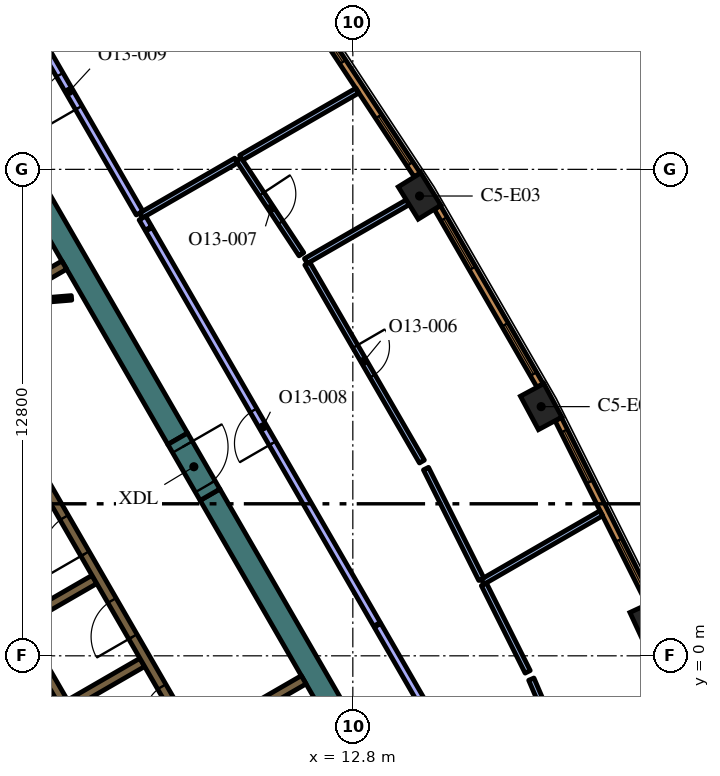
"""IFC4 building model, lengths in metres.
Left out: names, types, materials, properties, quantities, classifications, styles, units other than length and angle.
Written with IfcOpenShell. Run it as: python <this file> out.ifc"""

import sys

from ifc_helpers import new_model, si_unit, direction, frame, frame_2d, origin, origin_2d, place, context, subcontext, project, spatial, polyline, rectangle, outline, extrude, element, fill, save


model = new_model("IFC4")
c1 = context("Model", 3, precision=1e-05, world=origin(), true_north=direction((0.0, 1.0)))
c2 = subcontext(c1, "Body", "Model", "MODEL_VIEW")
j1 = project(units=[si_unit("LENGTHUNIT", "METRE"), si_unit("PLANEANGLEUNIT", "RADIAN")], contexts=[c1])
p1 = place(None, origin())
s1 = spatial("IfcSite", under=j1, at=p1, CompositionType="ELEMENT")
p2 = place(p1, origin())
s2 = spatial("IfcBuilding", under=s1, at=p2, CompositionType="ELEMENT")
p3 = place(p2, frame((0.0, 0.0, 292.2)))
s3 = spatial("IfcBuildingStorey", under=s2, at=p3, CompositionType="ELEMENT", Elevation=292.2)
for number, where, z_axis, x_axis in (
    (1, (20.619, 0.834, 0.0), (0.0, 0.0, 1.0), (-0.421, 0.907, 0.0)),
    (2, (17.756, 6.557, 0.0), (0.0, 0.0, 1.0), (-0.474, 0.881, 0.0)),
    (3, (14.556, 12.098, 0.0), (0.0, 0.0, 1.0), (-0.526, 0.851, 0.0)),
):
    element("IfcColumn", number, at=place(p3, frame(where, z_axis=z_axis, x_axis=x_axis)), inside=s3, PredefinedType="COLUMN", context=c2, shape_type="SweptSolid", body=[
        extrude(rectangle(XDim=1.0, YDim=0.7, at=origin_2d()), origin(), (0.0, 0.0, 1.0), 4.2),
    ])
for number, where, z_axis, x_axis in (
    (4, (9.042, 4.239, 0.0), (0.0, 0.0, 1.0), (0.5, -0.866, 0.0)),
    (5, (1.989, 16.456, 0.0), (0.0, 0.0, 1.0), (0.5, -0.866, 0.0)),
):
    element("IfcWall", number, at=place(p3, frame(where, z_axis=z_axis, x_axis=x_axis)), inside=s3, PredefinedType="SOLIDWALL", context=c2, shape_type="SweptSolid", body=[
        extrude(rectangle(XDim=12.406, YDim=0.6, at=frame_2d((6.203, 0.0))), origin(), (0.0, 0.0, 1.0), 4.2),
    ])
p4 = place(p3, origin())
e6 = element("IfcWall", 6, at=p4, inside=s3, PredefinedType="SOLIDWALL", context=c2, shape_type="SweptSolid", body=[
    extrude(outline(polyline([(0.332, 6.925), (0.335, 6.925), (0.335, 6.925), (0.335, 6.925), (0.335, 7.075), (0.335, 7.075), (0.335, 7.075), (0.245, 7.075), (0.035, 7.439), (0.252, 7.564), (0.377, 7.348), (1.512, 5.382), (1.637, 5.165), (2.221, 4.153), (2.771, 3.199), (2.896, 2.983), (3.138, 2.564), (4.031, 1.017), (4.156, 0.801), (5.292, -1.165), (5.417, -1.382), (6.073, -2.519), (6.552, -3.348), (6.677, -3.564), (6.46, -3.689), (0.332, 6.925)])), origin(), (0.0, 0.0, 1.0), 4.2),
])
for number, where, z_axis, x_axis in (
    (7, (4.094, 0.909, 0.0), (0.0, 0.0, 1.0), (0.866, 0.5, 0.0)),
    (8, (5.354, -1.274, 0.0), (0.0, 0.0, 1.0), (0.866, 0.5, 0.0)),
):
    element("IfcWall", number, at=place(p3, frame(where, z_axis=z_axis, x_axis=x_axis)), inside=s3, PredefinedType="SOLIDWALL", context=c2, shape_type="SweptSolid", body=[
        extrude(rectangle(XDim=2.2, YDim=0.25, at=frame_2d((1.1, 0.0))), origin(), (0.0, 0.0, 1.0), 4.2),
    ])
p5 = place(p3, frame((11.507, -0.631, 0.0), z_axis=(0.0, 0.0, 1.0), x_axis=(-0.866011447264, -0.500024172624, 0.0)))
e9 = element("IfcWall", 9, at=p5, inside=s3, PredefinedType="SOLIDWALL", context=c2, shape_type="SweptSolid", body=[
    extrude(rectangle(XDim=5.65, YDim=0.25, at=frame_2d((2.825, 0.0))), origin(), (0.0, 0.0, 1.0), 4.2),
])
p6 = place(p3, frame((3.83, 9.486, 0.0), z_axis=(0.0, 0.0, 1.0), x_axis=(0.865986202621, 0.500067892261, 0.0)))
e10 = element("IfcWall", 10, at=p6, inside=s3, PredefinedType="SOLIDWALL", context=c2, shape_type="SweptSolid", body=[
    extrude(rectangle(XDim=1.591, YDim=0.25, at=frame_2d((0.795, 0.0))), origin(), (0.0, 0.0, 1.0), 4.2),
])
p7 = place(p3, frame((8.565, -2.185, 0.0), z_axis=(0.0, 0.0, 1.0), x_axis=(-0.499997954832, 0.866026584559, 0.0)))
e11 = element("IfcWall", 11, at=p7, inside=s3, PredefinedType="SOLIDWALL", context=c2, shape_type="SweptSolid", body=[
    extrude(rectangle(XDim=12.35, YDim=0.25, at=frame_2d((6.175, 0.0))), origin(), (0.0, 0.0, 1.0), 4.2),
])
p8 = place(p7, frame((0.685, 0.0, 0.0)))
e12 = element("IfcOpeningElement", 12, at=p8, cuts=e11, PredefinedType="OPENING", context=c2, shape_type="SweptSolid", body=[
    extrude(rectangle(XDim=0.9, YDim=2.1, at=frame_2d((0.45, 1.05))), frame((0.0, 0.135, 0.0), z_axis=(0.0, -1.0, 0.0), x_axis=(1.0, 0.0, 0.0)), (0.0, 0.0, 1.0), 0.27),
])
p9 = place(p7, frame((3.105, 0.0, 0.0)))
e13 = element("IfcOpeningElement", 13, at=p9, cuts=e11, PredefinedType="OPENING", context=c2, shape_type="SweptSolid", body=[
    extrude(rectangle(XDim=1.1, YDim=2.1, at=frame_2d((0.55, 1.05))), frame((0.0, 0.135, 0.0), z_axis=(0.0, -1.0, 0.0), x_axis=(1.0, 0.0, 0.0)), (0.0, 0.0, 1.0), 0.27),
])
p10 = place(p7, frame((5.625, 0.0, 0.0)))
e14 = element("IfcOpeningElement", 14, at=p10, cuts=e11, PredefinedType="OPENING", context=c2, shape_type="SweptSolid", body=[
    extrude(rectangle(XDim=1.1, YDim=2.1, at=frame_2d((0.55, 1.05))), frame((0.0, 0.135, 0.0), z_axis=(0.0, -1.0, 0.0), x_axis=(1.0, 0.0, 0.0)), (0.0, 0.0, 1.0), 0.27),
])
p11 = place(p7, frame((8.145, 0.0, 0.0)))
e15 = element("IfcOpeningElement", 15, at=p11, cuts=e11, PredefinedType="OPENING", context=c2, shape_type="SweptSolid", body=[
    extrude(rectangle(XDim=1.1, YDim=2.1, at=frame_2d((0.55, 1.05))), frame((0.0, 0.135, 0.0), z_axis=(0.0, -1.0, 0.0), x_axis=(1.0, 0.0, 0.0)), (0.0, 0.0, 1.0), 0.27),
])
p12 = place(p7, frame((10.665, 0.0, 0.0)))
e16 = element("IfcOpeningElement", 16, at=p12, cuts=e11, PredefinedType="OPENING", context=c2, shape_type="SweptSolid", body=[
    extrude(rectangle(XDim=1.1, YDim=2.1, at=frame_2d((0.55, 1.05))), frame((0.0, 0.135, 0.0), z_axis=(0.0, -1.0, 0.0), x_axis=(1.0, 0.0, 0.0)), (0.0, 0.0, 1.0), 0.27),
])
p13 = place(p3, frame((5.398, 9.419, 0.0), z_axis=(0.0, 0.0, 1.0), x_axis=(-0.996653416376, -0.081743303248, 0.0)))
e17 = element("IfcWall", 17, at=p13, inside=s3, PredefinedType="PARTITIONING", context=c2, shape_type="SweptSolid", body=[
    extrude(rectangle(XDim=2.7, YDim=0.12, at=frame_2d((1.35, 0.0))), origin(), (0.0, 0.0, 1.0), 3.55),
])
p14 = place(p13, frame((1.45, 0.0, 0.0)))
e18 = element("IfcOpeningElement", 18, at=p14, cuts=e17, PredefinedType="OPENING", context=c2, shape_type="SweptSolid", body=[
    extrude(rectangle(XDim=0.9, YDim=2.1, at=frame_2d((0.45, 1.05))), frame((0.0, 0.07, 0.0), z_axis=(0.0, -1.0, 0.0), x_axis=(1.0, 0.0, 0.0)), (0.0, 0.0, 1.0), 0.14),
])
p15 = place(p3, frame((8.192, 5.711, 0.0), z_axis=(0.0, 0.0, 1.0), x_axis=(0.500062241894, -0.865989465428, 0.0)))
e19 = element("IfcWall", 19, at=p15, inside=s3, PredefinedType="SOLIDWALL", context=c2, shape_type="SweptSolid", body=[
    extrude(rectangle(XDim=1.7, YDim=0.6, at=frame_2d((0.85, 0.0))), origin(), (0.0, 0.0, 1.0), 4.2),
])
p16 = place(p15, frame((0.25, 0.0, 0.0)))
e20 = element("IfcOpeningElement", 20, at=p16, cuts=e19, PredefinedType="OPENING", context=c2, shape_type="SweptSolid", body=[
    extrude(rectangle(XDim=1.2, YDim=2.1, at=frame_2d((0.6, 1.05))), frame((0.0, 0.31, 0.0), z_axis=(0.0, -1.0, 0.0), x_axis=(1.0, 0.0, 0.0)), (0.0, 0.0, 1.0), 0.62),
])
p17 = place(p3, frame((16.215, 1.948, 0.0), z_axis=(0.0, 0.0, 1.0), x_axis=(0.866026634742, 0.499997867913, 0.0)))
e21 = element("IfcWall", 21, at=p17, inside=s3, PredefinedType="PARTITIONING", context=c2, shape_type="SweptSolid", body=[
    extrude(rectangle(XDim=3.606, YDim=0.15, at=frame_2d((1.803, 0.0))), origin(), (0.0, 0.0, 1.0), 3.55),
])
p18 = place(p3, frame((17.497, -0.613, 0.0), z_axis=(0.0, 0.0, 1.0), x_axis=(0.393381340755, -0.919375397075, 0.0)))
e22 = element("IfcWall", 22, at=p18, inside=s3, PredefinedType="PARTITIONING", context=c2, shape_type="SweptSolid", body=[
    extrude(rectangle(XDim=5.368, YDim=0.15, at=frame_2d((2.684, 0.0))), origin(), (0.0, 0.0, 1.0), 3.55),
])
p19 = place(p18, frame((2.268, 0.0, 0.0)))
e23 = element("IfcOpeningElement", 23, at=p19, cuts=e22, PredefinedType="OPENING", context=c2, shape_type="SweptSolid", body=[
    extrude(rectangle(XDim=0.9, YDim=2.1, at=frame_2d((0.45, 1.05))), frame((0.0, 0.085, 0.0), z_axis=(0.0, -1.0, 0.0), x_axis=(1.0, 0.0, 0.0)), (0.0, 0.0, 1.0), 0.17),
])
p20 = place(p3, frame((17.401, -0.422, 0.0), z_axis=(0.0, 0.0, 1.0), x_axis=(-0.447479029466, 0.894294424778, 0.0)))
e24 = element("IfcWall", 24, at=p20, inside=s3, PredefinedType="PARTITIONING", context=c2, shape_type="SweptSolid", body=[
    extrude(rectangle(XDim=2.575, YDim=0.15, at=frame_2d((1.288, 0.0))), origin(), (0.0, 0.0, 1.0), 3.55),
])
p21 = place(p3, frame((11.564, 10.387, 0.0), z_axis=(0.0, 0.0, 1.0), x_axis=(0.86604641216, 0.499963610661, 0.0)))
e25 = element("IfcWall", 25, at=p21, inside=s3, PredefinedType="PARTITIONING", context=c2, shape_type="SweptSolid", body=[
    extrude(rectangle(XDim=3.096, YDim=0.15, at=frame_2d((1.548, 0.0))), origin(), (0.0, 0.0, 1.0), 3.55),
])
p22 = place(p3, frame((16.181, 2.015, 0.0), z_axis=(0.0, 0.0, 1.0), x_axis=(-0.447513663313, 0.894277094165, 0.0)))
e26 = element("IfcWall", 26, at=p22, inside=s3, PredefinedType="PARTITIONING", context=c2, shape_type="SweptSolid", body=[
    extrude(rectangle(XDim=3.254, YDim=0.15, at=frame_2d((1.627, 0.0))), origin(), (0.0, 0.0, 1.0), 3.55),
])
p23 = place(p3, frame((11.602, 10.322, 0.0), z_axis=(0.0, 0.0, 1.0), x_axis=(0.500961140821, -0.865469777281, 0.0)))
e27 = element("IfcWall", 27, at=p23, inside=s3, PredefinedType="PARTITIONING", context=c2, shape_type="SweptSolid", body=[
    extrude(rectangle(XDim=6.021, YDim=0.15, at=frame_2d((3.01, 0.0))), origin(), (0.0, 0.0, 1.0), 3.55),
])
p24 = place(p23, frame((2.521, 0.0, 0.0)))
e28 = element("IfcOpeningElement", 28, at=p24, cuts=e27, PredefinedType="OPENING", context=c2, shape_type="SweptSolid", body=[
    extrude(rectangle(XDim=0.9, YDim=2.1, at=frame_2d((0.45, 1.05))), frame((0.0, 0.085, 0.0), z_axis=(0.0, -1.0, 0.0), x_axis=(1.0, 0.0, 0.0)), (0.0, 0.0, 1.0), 0.17),
])
p25 = place(p3, frame((9.795, 13.068, 0.0), z_axis=(0.0, 0.0, 1.0), x_axis=(0.550767347659, -0.834658809786, 0.0)))
e29 = element("IfcWall", 29, at=p25, inside=s3, PredefinedType="PARTITIONING", context=c2, shape_type="SweptSolid", body=[
    extrude(rectangle(XDim=2.999, YDim=0.15, at=frame_2d((1.5, 0.0))), origin(), (0.0, 0.0, 1.0), 3.55),
])
p26 = place(p25, frame((1.099, 0.0, 0.0)))
e30 = element("IfcOpeningElement", 30, at=p26, cuts=e29, PredefinedType="OPENING", context=c2, shape_type="SweptSolid", body=[
    extrude(rectangle(XDim=0.9, YDim=2.1, at=frame_2d((0.45, 1.05))), frame((0.0, 0.085, 0.0), z_axis=(0.0, -1.0, 0.0), x_axis=(1.0, 0.0, 0.0)), (0.0, 0.0, 1.0), 0.17),
])
p27 = place(p3, frame((9.86, 13.106, 0.0), z_axis=(0.0, 0.0, 1.0), x_axis=(0.866022094817, 0.500005731256, 0.0)))
e31 = element("IfcWall", 31, at=p27, inside=s3, PredefinedType="PARTITIONING", context=c2, shape_type="SweptSolid", body=[
    extrude(rectangle(XDim=3.531, YDim=0.15, at=frame_2d((1.766, 0.0))), origin(), (0.0, 0.0, 1.0), 3.55),
])
p28 = place(p3, frame((7.226, 11.585, 0.0), z_axis=(0.0, 0.0, 1.0), x_axis=(0.866021079084, 0.500007490527, 0.0)))
e32 = element("IfcWall", 32, at=p28, inside=s3, PredefinedType="PARTITIONING", context=c2, shape_type="SweptSolid", body=[
    extrude(rectangle(XDim=2.892, YDim=0.15, at=frame_2d((1.446, 0.0))), origin(), (0.0, 0.0, 1.0), 3.55),
])
p29 = place(p3, frame((13.436, 0.829, 0.0), z_axis=(0.0, 0.0, 1.0), x_axis=(-0.49999894854, 0.866026010844, 0.0)))
e33 = element("IfcWall", 33, at=p29, inside=s3, PredefinedType="PARTITIONING", context=c2, shape_type="SweptSolid", body=[
    extrude(rectangle(XDim=12.0, YDim=0.2, at=frame_2d((6.0, 0.0))), origin(), (0.0, 0.0, 1.0), 3.55),
])
p30 = place(p29, frame((5.5, 0.0, 0.0)))
e34 = element("IfcOpeningElement", 34, at=p30, cuts=e33, PredefinedType="OPENING", context=c2, shape_type="SweptSolid", body=[
    extrude(rectangle(XDim=1.0, YDim=2.1, at=frame_2d((0.5, 1.05))), frame((0.0, 0.11, 0.0), z_axis=(0.0, -1.0, 0.0), x_axis=(1.0, 0.0, 0.0)), (0.0, 0.0, 1.0), 0.22),
])
p31 = place(p3, frame((7.421, 11.247, 0.0), z_axis=(0.0, 0.0, 1.0), x_axis=(-0.500303403544, 0.865850162789, 0.0)))
e35 = element("IfcWall", 35, at=p31, inside=s3, PredefinedType="PARTITIONING", context=c2, shape_type="SweptSolid", body=[
    extrude(rectangle(XDim=0.315, YDim=0.2, at=frame_2d((0.158, 0.0))), origin(), (0.0, 0.0, 1.0), 3.55),
])
p32 = place(p3, frame((17.565, -6.324, 0.0), z_axis=(0.0, 0.0, 1.0), x_axis=(-0.499977548053, 0.866038366034, 0.0)))
e36 = element("IfcWall", 36, at=p32, inside=s3, PredefinedType="PARTITIONING", context=c2, shape_type="SweptSolid", body=[
    extrude(rectangle(XDim=8.229, YDim=0.2, at=frame_2d((4.115, 0.0))), origin(), (0.0, 0.0, 1.0), 3.55),
])
p33 = place(p3, frame((7.188, 11.65, 0.0), z_axis=(0.0, 0.0, 1.0), x_axis=(-0.499989634868, 0.866031388014, 0.0)))
e37 = element("IfcWall", 37, at=p33, inside=s3, PredefinedType="PARTITIONING", context=c2, shape_type="SweptSolid", body=[
    extrude(rectangle(XDim=7.303, YDim=0.2, at=frame_2d((3.652, 0.0))), origin(), (0.0, 0.0, 1.0), 3.55),
])
p34 = place(p33, frame((3.2, 0.0, 0.0)))
e38 = element("IfcOpeningElement", 38, at=p34, cuts=e37, PredefinedType="OPENING", context=c2, shape_type="SweptSolid", body=[
    extrude(rectangle(XDim=1.0, YDim=2.1, at=frame_2d((0.5, 1.05))), frame((0.0, 0.11, 0.0), z_axis=(0.0, -1.0, 0.0), x_axis=(1.0, 0.0, 0.0)), (0.0, 0.0, 1.0), 0.22),
])
p35 = place(p3, frame((20.625, 1.392, 0.0), z_axis=(0.0, 0.0, 1.0), x_axis=(-0.447484531401, 0.894291671747, 0.0)))
e39 = element("IfcWall", 39, at=p35, inside=s3, PredefinedType="SOLIDWALL", context=c2, shape_type="SweptSolid", body=[
    extrude(rectangle(XDim=5.406, YDim=0.19, at=frame_2d((2.703, 0.0))), origin(), (0.0, 0.0, 1.0), 3.95),
])
p36 = place(p35, frame((0.346, 0.0, 0.6)))
e40 = element("IfcOpeningElement", 40, at=p36, cuts=e39, PredefinedType="OPENING", context=c2, shape_type="SweptSolid", body=[
    extrude(rectangle(XDim=1.5, YDim=2.85, at=frame_2d((0.75, 1.425))), frame((0.0, 0.105, 0.0), z_axis=(0.0, -1.0, 0.0), x_axis=(1.0, 0.0, 0.0)), (0.0, 0.0, 1.0), 0.21),
])
p37 = place(p35, frame((3.559, 0.0, 0.6)))
e41 = element("IfcOpeningElement", 41, at=p37, cuts=e39, PredefinedType="OPENING", context=c2, shape_type="SweptSolid", body=[
    extrude(rectangle(XDim=1.5, YDim=2.85, at=frame_2d((0.75, 1.425))), frame((0.0, 0.105, 0.0), z_axis=(0.0, -1.0, 0.0), x_axis=(1.0, 0.0, 0.0)), (0.0, 0.0, 1.0), 0.21),
])
p38 = place(p3, frame((17.728, 7.114, 0.0), z_axis=(0.0, 0.0, 1.0), x_axis=(-0.500024767483, 0.866011103799, 0.0)))
e42 = element("IfcWall", 42, at=p38, inside=s3, PredefinedType="SOLIDWALL", context=c2, shape_type="SweptSolid", body=[
    extrude(rectangle(XDim=5.406, YDim=0.19, at=frame_2d((2.703, 0.0))), origin(), (0.0, 0.0, 1.0), 3.95),
])
p39 = place(p38, frame((0.346, 0.0, 0.6)))
e43 = element("IfcOpeningElement", 43, at=p39, cuts=e42, PredefinedType="OPENING", context=c2, shape_type="SweptSolid", body=[
    extrude(rectangle(XDim=1.5, YDim=2.85, at=frame_2d((0.75, 1.425))), frame((0.0, 0.105, 0.0), z_axis=(0.0, -1.0, 0.0), x_axis=(1.0, 0.0, 0.0)), (0.0, 0.0, 1.0), 0.21),
])
p40 = place(p38, frame((3.56, 0.0, 0.6)))
e44 = element("IfcOpeningElement", 44, at=p40, cuts=e42, PredefinedType="OPENING", context=c2, shape_type="SweptSolid", body=[
    extrude(rectangle(XDim=1.5, YDim=2.85, at=frame_2d((0.75, 1.425))), frame((0.0, 0.105, 0.0), z_axis=(0.0, -1.0, 0.0), x_axis=(1.0, 0.0, 0.0)), (0.0, 0.0, 1.0), 0.21),
])
p41 = place(p3, frame((14.496, 12.653, 0.0), z_axis=(0.0, 0.0, 1.0), x_axis=(-0.550744054781, 0.83467417962, 0.0)))
e45 = element("IfcWall", 45, at=p41, inside=s3, PredefinedType="SOLIDWALL", context=c2, shape_type="SweptSolid", body=[
    extrude(rectangle(XDim=5.406, YDim=0.19, at=frame_2d((2.703, 0.0))), origin(), (0.0, 0.0, 1.0), 3.95),
])
p42 = place(p41, frame((0.346, 0.0, 0.6)))
e46 = element("IfcOpeningElement", 46, at=p42, cuts=e45, PredefinedType="OPENING", context=c2, shape_type="SweptSolid", body=[
    extrude(rectangle(XDim=1.5, YDim=2.85, at=frame_2d((0.75, 1.425))), frame((0.0, 0.105, 0.0), z_axis=(0.0, -1.0, 0.0), x_axis=(1.0, 0.0, 0.0)), (0.0, 0.0, 1.0), 0.21),
])
p43 = place(p41, frame((3.559, 0.0, 0.6)))
e47 = element("IfcOpeningElement", 47, at=p43, cuts=e45, PredefinedType="OPENING", context=c2, shape_type="SweptSolid", body=[
    extrude(rectangle(XDim=1.5, YDim=2.85, at=frame_2d((0.75, 1.425))), frame((0.0, 0.105, 0.0), z_axis=(0.0, -1.0, 0.0), x_axis=(1.0, 0.0, 0.0)), (0.0, 0.0, 1.0), 0.21),
])
p44 = place(p8, origin())
e48 = element("IfcDoor", 48, at=p44, inside=s3, OperationType="SINGLE_SWING_LEFT", PredefinedType="DOOR", context=c2, shape_type="SweptSolid", body=[
    extrude(rectangle(XDim=0.9, YDim=2.1, at=frame_2d((0.45, 1.05))), frame((0.0, 0.025, 0.0), z_axis=(0.0, -1.0, 0.0), x_axis=(1.0, 0.0, 0.0)), (0.0, 0.0, 1.0), 0.05),
])
fill(e12, e48)
p45 = place(p9, origin())
e49 = element("IfcDoor", 49, at=p45, inside=s3, OperationType="DOUBLE_DOOR_SLIDING", PredefinedType="DOOR", context=c2, shape_type="SweptSolid", body=[
    extrude(rectangle(XDim=1.1, YDim=2.1, at=frame_2d((0.55, 1.05))), frame((0.0, 0.025, 0.0), z_axis=(0.0, -1.0, 0.0), x_axis=(1.0, 0.0, 0.0)), (0.0, 0.0, 1.0), 0.05),
])
fill(e13, e49)
p46 = place(p10, origin())
e50 = element("IfcDoor", 50, at=p46, inside=s3, OperationType="DOUBLE_DOOR_SLIDING", PredefinedType="DOOR", context=c2, shape_type="SweptSolid", body=[
    extrude(rectangle(XDim=1.1, YDim=2.1, at=frame_2d((0.55, 1.05))), frame((0.0, 0.025, 0.0), z_axis=(0.0, -1.0, 0.0), x_axis=(1.0, 0.0, 0.0)), (0.0, 0.0, 1.0), 0.05),
])
fill(e14, e50)
p47 = place(p16, origin())
e51 = element("IfcDoor", 51, at=p47, inside=s3, OperationType="SINGLE_SWING_LEFT", PredefinedType="DOOR", context=c2, shape_type="SweptSolid", body=[
    extrude(rectangle(XDim=1.2, YDim=2.1, at=frame_2d((0.6, 1.05))), frame((0.0, 0.025, 0.0), z_axis=(0.0, -1.0, 0.0), x_axis=(1.0, 0.0, 0.0)), (0.0, 0.0, 1.0), 0.05),
])
fill(e20, e51)
p48 = place(p24, origin())
e52 = element("IfcDoor", 52, at=p48, inside=s3, OperationType="SINGLE_SWING_LEFT", PredefinedType="DOOR", context=c2, shape_type="SweptSolid", body=[
    extrude(rectangle(XDim=0.9, YDim=2.1, at=frame_2d((0.45, 1.05))), frame((0.0, 0.025, 0.0), z_axis=(0.0, -1.0, 0.0), x_axis=(1.0, 0.0, 0.0)), (0.0, 0.0, 1.0), 0.05),
])
fill(e28, e52)
p49 = place(p26, origin())
e53 = element("IfcDoor", 53, at=p49, inside=s3, OperationType="SINGLE_SWING_RIGHT", PredefinedType="DOOR", context=c2, shape_type="SweptSolid", body=[
    extrude(rectangle(XDim=0.9, YDim=2.1, at=frame_2d((0.45, 1.05))), frame((0.0, 0.025, 0.0), z_axis=(0.0, -1.0, 0.0), x_axis=(1.0, 0.0, 0.0)), (0.0, 0.0, 1.0), 0.05),
])
fill(e30, e53)
p50 = place(p30, origin())
e54 = element("IfcDoor", 54, at=p50, inside=s3, OperationType="SINGLE_SWING_RIGHT", PredefinedType="DOOR", context=c2, shape_type="SweptSolid", body=[
    extrude(rectangle(XDim=1.0, YDim=2.1, at=frame_2d((0.5, 1.05))), frame((0.0, 0.025, 0.0), z_axis=(0.0, -1.0, 0.0), x_axis=(1.0, 0.0, 0.0)), (0.0, 0.0, 1.0), 0.05),
])
fill(e34, e54)
p51 = place(p34, origin())
e55 = element("IfcDoor", 55, at=p51, inside=s3, OperationType="SINGLE_SWING_RIGHT", PredefinedType="DOOR", context=c2, shape_type="SweptSolid", body=[
    extrude(rectangle(XDim=1.0, YDim=2.1, at=frame_2d((0.5, 1.05))), frame((0.0, 0.025, 0.0), z_axis=(0.0, -1.0, 0.0), x_axis=(1.0, 0.0, 0.0)), (0.0, 0.0, 1.0), 0.05),
])
fill(e38, e55)
p52 = place(p36, origin())
e56 = element("IfcWindow", 56, at=p52, inside=s3, PartitioningType="SINGLE_PANEL", PredefinedType="WINDOW", context=c2, shape_type="SweptSolid", body=[
    extrude(rectangle(XDim=1.5, YDim=2.85, at=frame_2d((0.75, 1.425))), frame((0.0, 0.045, 0.0), z_axis=(0.0, -1.0, 0.0), x_axis=(1.0, 0.0, 0.0)), (0.0, 0.0, 1.0), 0.06),
])
fill(e40, e56)
p53 = place(p37, origin())
e57 = element("IfcWindow", 57, at=p53, inside=s3, PartitioningType="SINGLE_PANEL", PredefinedType="WINDOW", context=c2, shape_type="SweptSolid", body=[
    extrude(rectangle(XDim=1.5, YDim=2.85, at=frame_2d((0.75, 1.425))), frame((0.0, 0.045, 0.0), z_axis=(0.0, -1.0, 0.0), x_axis=(1.0, 0.0, 0.0)), (0.0, 0.0, 1.0), 0.06),
])
fill(e41, e57)
p54 = place(p39, origin())
e58 = element("IfcWindow", 58, at=p54, inside=s3, PartitioningType="SINGLE_PANEL", PredefinedType="WINDOW", context=c2, shape_type="SweptSolid", body=[
    extrude(rectangle(XDim=1.5, YDim=2.85, at=frame_2d((0.75, 1.425))), frame((0.0, 0.045, 0.0), z_axis=(0.0, -1.0, 0.0), x_axis=(1.0, 0.0, 0.0)), (0.0, 0.0, 1.0), 0.06),
])
fill(e43, e58)
p55 = place(p40, origin())
e59 = element("IfcWindow", 59, at=p55, inside=s3, PartitioningType="SINGLE_PANEL", PredefinedType="WINDOW", context=c2, shape_type="SweptSolid", body=[
    extrude(rectangle(XDim=1.5, YDim=2.85, at=frame_2d((0.75, 1.425))), frame((0.0, 0.045, 0.0), z_axis=(0.0, -1.0, 0.0), x_axis=(1.0, 0.0, 0.0)), (0.0, 0.0, 1.0), 0.06),
])
fill(e44, e59)
p56 = place(p42, origin())
e60 = element("IfcWindow", 60, at=p56, inside=s3, PartitioningType="SINGLE_PANEL", PredefinedType="WINDOW", context=c2, shape_type="SweptSolid", body=[
    extrude(rectangle(XDim=1.5, YDim=2.85, at=frame_2d((0.75, 1.425))), frame((0.0, 0.045, 0.0), z_axis=(0.0, -1.0, 0.0), x_axis=(1.0, 0.0, 0.0)), (0.0, 0.0, 1.0), 0.06),
])
fill(e46, e60)
p57 = place(p43, origin())
e61 = element("IfcWindow", 61, at=p57, inside=s3, PartitioningType="SINGLE_PANEL", PredefinedType="WINDOW", context=c2, shape_type="SweptSolid", body=[
    extrude(rectangle(XDim=1.5, YDim=2.85, at=frame_2d((0.75, 1.425))), frame((0.0, 0.045, 0.0), z_axis=(0.0, -1.0, 0.0), x_axis=(1.0, 0.0, 0.0)), (0.0, 0.0, 1.0), 0.06),
])
fill(e47, e61)
save(model, sys.argv[1])
